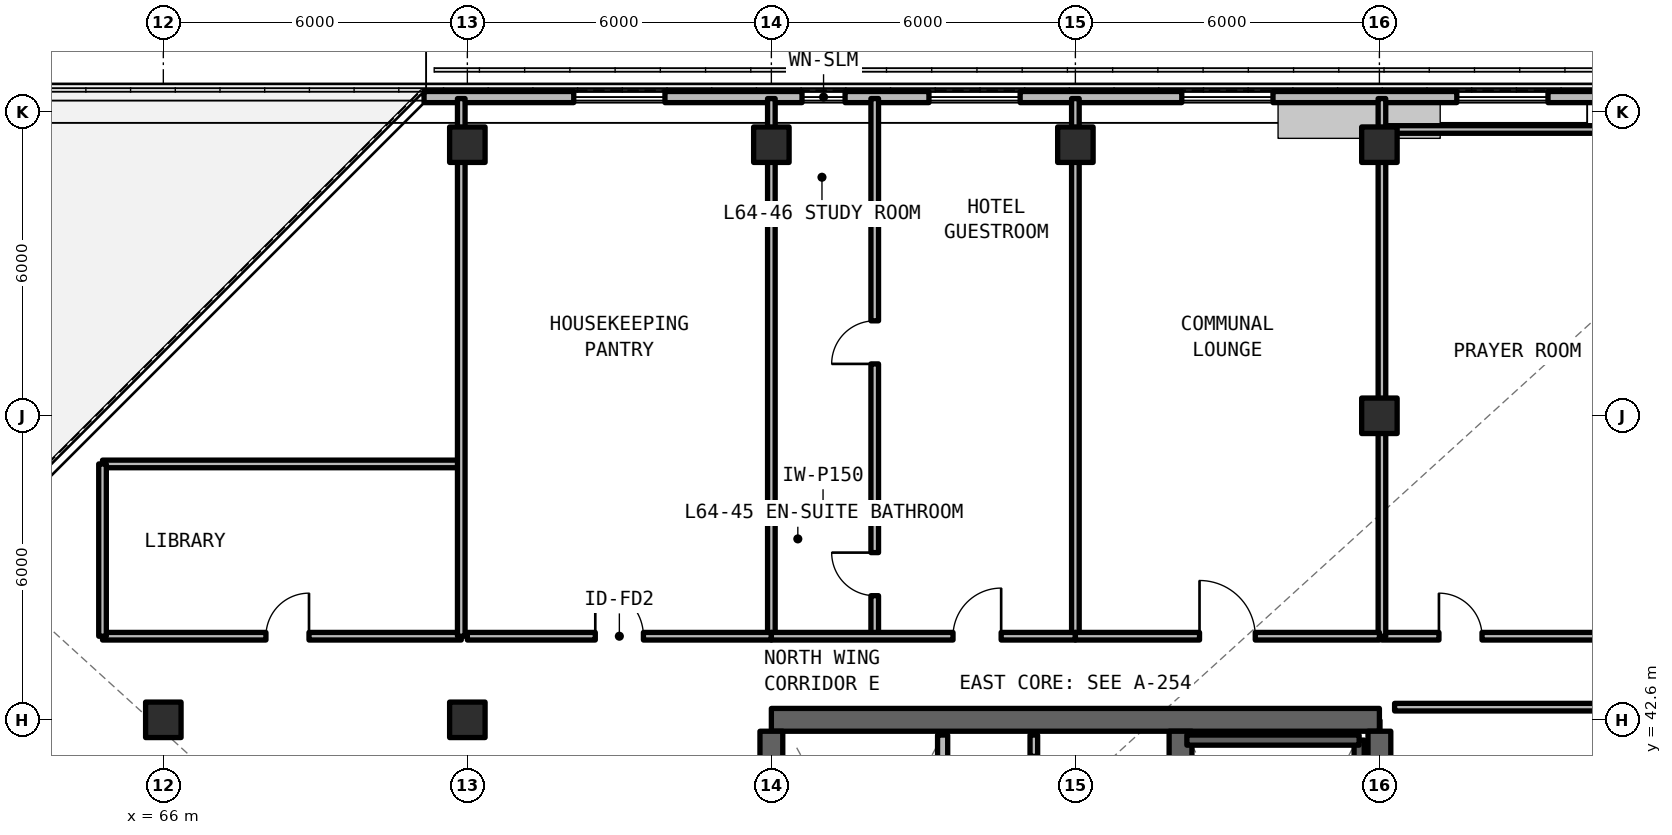
"""IFC4 building model, lengths in metres.
Left out: names, types, materials, properties, quantities, classifications, styles, units other than length and angle.
Written with IfcOpenShell. Run it as: python <this file> out.ifc"""

import sys

from ifc_helpers import new_model, si_unit, direction, frame, frame_2d, origin, origin_2d, place, context, subcontext, project, spatial, rectangle, extrude, element, fill, save


model = new_model("IFC4")
c1 = context("Model", 3, precision=1e-05, world=origin(), true_north=direction((0.0, 1.0)))
c2 = subcontext(c1, "Body", "Model", "MODEL_VIEW")
j1 = project(units=[si_unit("LENGTHUNIT", "METRE"), si_unit("PLANEANGLEUNIT", "RADIAN")], contexts=[c1])
p1 = place(None, origin())
s1 = spatial("IfcSite", under=j1, at=p1, CompositionType="ELEMENT")
p2 = place(p1, origin())
s2 = spatial("IfcBuilding", under=s1, at=p2, CompositionType="ELEMENT")
p3 = place(p2, frame((0.0, 0.0, 229.35)))
s3 = spatial("IfcBuildingStorey", under=s2, at=p3, CompositionType="ELEMENT", Elevation=229.35)
p4 = place(p3, frame((90.0, 42.6, 0.0), z_axis=(0.0, 0.0, 1.0), x_axis=(-1.0, 0.0, 0.0)))
e1 = element("IfcWall", 1, at=p4, inside=s3, PredefinedType="SHEAR", context=c2, shape_type="SweptSolid", body=[
    extrude(rectangle(XDim=12.0, YDim=0.45, at=frame_2d((6.0, 0.0))), origin(), (0.0, 0.0, 1.0), 3.3),
])
p5 = place(p3, frame((90.0, 24.825, 0.0), z_axis=(0.0, 0.0, 1.0), x_axis=(0.0, 1.0, 0.0)))
e2 = element("IfcWall", 2, at=p5, inside=s3, PredefinedType="SHEAR", context=c2, shape_type="SweptSolid", body=[
    extrude(rectangle(XDim=17.55, YDim=0.45, at=frame_2d((8.775, 0.0))), origin(), (0.0, 0.0, 1.0), 3.3),
])
p6 = place(p3, frame((78.0, 36.8, 0.0), z_axis=(0.0, 0.0, 1.0), x_axis=(0.0, 1.0, 0.0)))
e3 = element("IfcWall", 3, at=p6, inside=s3, PredefinedType="SHEAR", context=c2, shape_type="SweptSolid", body=[
    extrude(rectangle(XDim=5.575, YDim=0.45, at=frame_2d((2.788, 0.0))), origin(), (0.0, 0.0, 1.0), 3.3),
])
p7 = place(p3, frame((86.075, 24.825, 0.0), z_axis=(0.0, 0.0, 1.0), x_axis=(0.0, 1.0, 0.0)))
e4 = element("IfcWall", 4, at=p7, inside=s3, PredefinedType="SHEAR", context=c2, shape_type="SweptSolid", body=[
    extrude(rectangle(XDim=17.55, YDim=0.45, at=frame_2d((8.775, 0.0))), origin(), (0.0, 0.0, 1.0), 3.3),
])
p8 = place(p7, frame((0.425, 0.0, 0.0)))
e5 = element("IfcOpeningElement", 5, at=p8, cuts=e4, PredefinedType="OPENING", context=c2, shape_type="SweptSolid", body=[
    extrude(rectangle(XDim=1.15, YDim=2.15, at=frame_2d((0.575, 1.075))), frame((0.0, 0.235, 0.0), z_axis=(0.0, -1.0, 0.0), x_axis=(1.0, 0.0, 0.0)), (0.0, 0.0, 1.0), 0.47),
])
p9 = place(p7, frame((9.625, 0.0, 0.0)))
e6 = element("IfcOpeningElement", 6, at=p9, cuts=e4, PredefinedType="OPENING", context=c2, shape_type="SweptSolid", body=[
    extrude(rectangle(XDim=1.15, YDim=2.15, at=frame_2d((0.575, 1.075))), frame((0.0, 0.235, 0.0), z_axis=(0.0, -1.0, 0.0), x_axis=(1.0, 0.0, 0.0)), (0.0, 0.0, 1.0), 0.47),
])
for number, where, z_axis, x_axis in (
    (7, (66.0, 42.6, 0.0), (0.0, 0.0, 1.0), (1.0, 0.0, 0.0)),
    (8, (72.0, 42.6, 0.0), (0.0, 0.0, 1.0), (1.0, 0.0, 0.0)),
    (9, (90.0, 48.6, 0.0), (0.0, 0.0, 1.0), (1.0, 0.0, 0.0)),
    (10, (72.0, 53.95, 0.0), (0.0, 0.0, 1.0), (1.0, 0.0, 0.0)),
    (11, (78.0, 53.95, 0.0), (0.0, 0.0, 1.0), (1.0, 0.0, 0.0)),
    (12, (84.0, 53.95, 0.0), (0.0, 0.0, 1.0), (1.0, 0.0, 0.0)),
    (13, (90.0, 53.95, 0.0), (0.0, 0.0, 1.0), (1.0, 0.0, 0.0)),
):
    element("IfcColumn", number, at=place(p3, frame(where, z_axis=z_axis, x_axis=x_axis)), inside=s3, PredefinedType="COLUMN", context=c2, shape_type="SweptSolid", body=[
        extrude(rectangle(XDim=0.7, YDim=0.7, at=origin_2d()), origin(), (0.0, 0.0, 1.0), 3.3),
    ])
p10 = place(p3, frame((94.754, 54.89, 0.0), z_axis=(0.0, 0.0, 1.0), x_axis=(-1.0, 0.0, 0.0)))
e14 = element("IfcWall", 14, at=p10, inside=s3, PredefinedType="SOLIDWALL", context=c2, shape_type="SweptSolid", body=[
    extrude(rectangle(XDim=23.609, YDim=0.22, at=frame_2d((11.804, 0.0))), origin(), (0.0, 0.0, 1.0), 3.08),
])
p11 = place(p10, frame((1.427, 0.0, 0.78)))
e15 = element("IfcOpeningElement", 15, at=p11, cuts=e14, PredefinedType="OPENING", context=c2, shape_type="SweptSolid", body=[
    extrude(rectangle(XDim=1.8, YDim=1.66, at=frame_2d((0.9, 0.83))), frame((0.0, 0.12, 0.0), z_axis=(0.0, -1.0, 0.0), x_axis=(1.0, 0.0, 0.0)), (0.0, 0.0, 1.0), 0.24),
])
p12 = place(p10, frame((18.854, 0.0, 0.78)))
e16 = element("IfcOpeningElement", 16, at=p12, cuts=e14, PredefinedType="OPENING", context=c2, shape_type="SweptSolid", body=[
    extrude(rectangle(XDim=1.8, YDim=1.66, at=frame_2d((0.9, 0.83))), frame((0.0, 0.12, 0.0), z_axis=(0.0, -1.0, 0.0), x_axis=(1.0, 0.0, 0.0)), (0.0, 0.0, 1.0), 0.24),
])
p13 = place(p10, frame((15.299, 0.0, 0.78)))
e17 = element("IfcOpeningElement", 17, at=p13, cuts=e14, PredefinedType="OPENING", context=c2, shape_type="SweptSolid", body=[
    extrude(rectangle(XDim=0.85, YDim=1.65, at=frame_2d((0.425, 0.825))), frame((0.0, 0.12, 0.0), z_axis=(0.0, -1.0, 0.0), x_axis=(1.0, 0.0, 0.0)), (0.0, 0.0, 1.0), 0.24),
])
p14 = place(p10, frame((11.844, 0.0, 0.78)))
e18 = element("IfcOpeningElement", 18, at=p14, cuts=e14, PredefinedType="OPENING", context=c2, shape_type="SweptSolid", body=[
    extrude(rectangle(XDim=1.8, YDim=1.66, at=frame_2d((0.9, 0.83))), frame((0.0, 0.12, 0.0), z_axis=(0.0, -1.0, 0.0), x_axis=(1.0, 0.0, 0.0)), (0.0, 0.0, 1.0), 0.24),
])
p15 = place(p10, frame((6.854, 0.0, 0.78)))
e19 = element("IfcOpeningElement", 19, at=p15, cuts=e14, PredefinedType="OPENING", context=c2, shape_type="SweptSolid", body=[
    extrude(rectangle(XDim=1.8, YDim=1.66, at=frame_2d((0.9, 0.83))), frame((0.0, 0.12, 0.0), z_axis=(0.0, -1.0, 0.0), x_axis=(1.0, 0.0, 0.0)), (0.0, 0.0, 1.0), 0.24),
])
p16 = place(p3, frame((83.18, 36.88, 0.0), z_axis=(0.0, 0.0, 1.0), x_axis=(0.0, 1.0, 0.0)))
e20 = element("IfcWall", 20, at=p16, inside=s3, PredefinedType="SOLIDWALL", context=c2, shape_type="SweptSolid", body=[
    extrude(rectangle(XDim=5.42, YDim=0.15, at=frame_2d((2.71, 0.0))), origin(), (0.0, 0.0, 1.0), 2.35),
])
p17 = place(p16, frame((1.15, 0.0, 0.0)))
e21 = element("IfcOpeningElement", 21, at=p17, cuts=e20, PredefinedType="OPENING", context=c2, shape_type="SweptSolid", body=[
    extrude(rectangle(XDim=0.95, YDim=2.15, at=frame_2d((0.475, 1.075))), frame((0.0, 0.085, 0.0), z_axis=(0.0, -1.0, 0.0), x_axis=(1.0, 0.0, 0.0)), (0.0, 0.0, 1.0), 0.17),
])
p18 = place(p16, frame((4.05, 0.0, 0.0)))
e22 = element("IfcOpeningElement", 22, at=p18, cuts=e20, PredefinedType="OPENING", context=c2, shape_type="SweptSolid", body=[
    extrude(rectangle(XDim=0.95, YDim=2.15, at=frame_2d((0.475, 1.075))), frame((0.0, 0.085, 0.0), z_axis=(0.0, -1.0, 0.0), x_axis=(1.0, 0.0, 0.0)), (0.0, 0.0, 1.0), 0.17),
])
p19 = place(p3, frame((81.38, 36.88, 0.0), z_axis=(0.0, 0.0, 1.0), x_axis=(0.0, 1.0, 0.0)))
e23 = element("IfcWall", 23, at=p19, inside=s3, PredefinedType="SOLIDWALL", context=c2, shape_type="SweptSolid", body=[
    extrude(rectangle(XDim=5.42, YDim=0.2, at=frame_2d((2.71, 0.0))), origin(), (0.0, 0.0, 1.0), 2.35),
])
p20 = place(p19, frame((0.8, 0.0, 0.0)))
e24 = element("IfcOpeningElement", 24, at=p20, cuts=e23, PredefinedType="OPENING", context=c2, shape_type="SweptSolid", body=[
    extrude(rectangle(XDim=1.1, YDim=2.2, at=frame_2d((0.55, 1.1))), frame((0.0, 0.11, 0.0), z_axis=(0.0, -1.0, 0.0), x_axis=(1.0, 0.0, 0.0)), (0.0, 0.0, 1.0), 0.22),
])
p21 = place(p19, frame((3.3, 0.0, 0.0)))
e25 = element("IfcOpeningElement", 25, at=p21, cuts=e23, PredefinedType="OPENING", context=c2, shape_type="SweptSolid", body=[
    extrude(rectangle(XDim=1.1, YDim=2.2, at=frame_2d((0.55, 1.1))), frame((0.0, 0.11, 0.0), z_axis=(0.0, -1.0, 0.0), x_axis=(1.0, 0.0, 0.0)), (0.0, 0.0, 1.0), 0.22),
])
p22 = place(p3, frame((64.8, 44.25, 0.0), z_axis=(0.0, 0.0, 1.0), x_axis=(1.0, 0.0, 0.0)))
e26 = element("IfcWall", 26, at=p22, inside=s3, PredefinedType="SOLIDWALL", context=c2, shape_type="SweptSolid", body=[
    extrude(rectangle(XDim=7.08, YDim=0.15, at=frame_2d((3.54, 0.0))), origin(), (0.0, 0.0, 1.0), 2.35),
])
p23 = place(p22, frame((3.225, 0.0, 0.0)))
e27 = element("IfcOpeningElement", 27, at=p23, cuts=e26, PredefinedType="OPENING", context=c2, shape_type="SweptSolid", body=[
    extrude(rectangle(XDim=0.85, YDim=2.1, at=frame_2d((0.425, 1.05))), frame((0.0, 0.085, 0.0), z_axis=(0.0, -1.0, 0.0), x_axis=(1.0, 0.0, 0.0)), (0.0, 0.0, 1.0), 0.17),
])
p24 = place(p3, frame((64.8, 47.65, 0.0), z_axis=(0.0, 0.0, 1.0), x_axis=(1.0, 0.0, 0.0)))
e28 = element("IfcWall", 28, at=p24, inside=s3, PredefinedType="SOLIDWALL", context=c2, shape_type="SweptSolid", body=[
    extrude(rectangle(XDim=7.08, YDim=0.15, at=frame_2d((3.54, 0.0))), origin(), (0.0, 0.0, 1.0), 2.35),
])
p25 = place(p3, frame((64.8, 44.25, 0.0), z_axis=(0.0, 0.0, 1.0), x_axis=(0.0, 1.0, 0.0)))
e29 = element("IfcWall", 29, at=p25, inside=s3, PredefinedType="SOLIDWALL", context=c2, shape_type="SweptSolid", body=[
    extrude(rectangle(XDim=3.4, YDim=0.15, at=frame_2d((1.7, 0.0))), origin(), (0.0, 0.0, 1.0), 2.35),
])
p26 = place(p3, frame((71.88, 44.25, 0.0), z_axis=(0.0, 0.0, 1.0), x_axis=(0.0, 1.0, 0.0)))
e30 = element("IfcWall", 30, at=p26, inside=s3, PredefinedType="SOLIDWALL", context=c2, shape_type="SweptSolid", body=[
    extrude(rectangle(XDim=10.61, YDim=0.15, at=frame_2d((5.305, 0.0))), origin(), (0.0, 0.0, 1.0), 2.35),
])
p27 = place(p3, frame((90.3, 42.85, 0.0), z_axis=(0.0, 0.0, 1.0), x_axis=(1.0, 0.0, 0.0)))
e31 = element("IfcWall", 31, at=p27, inside=s3, PredefinedType="SOLIDWALL", context=c2, shape_type="SweptSolid", body=[
    extrude(rectangle(XDim=8.52, YDim=0.15, at=frame_2d((4.26, 0.0))), origin(), (0.0, 0.0, 1.0), 2.35),
])
p28 = place(p3, frame((90.05, 44.25, 0.0), z_axis=(0.0, 0.0, 1.0), x_axis=(1.0, 0.0, 0.0)))
e32 = element("IfcWall", 32, at=p28, inside=s3, PredefinedType="SOLIDWALL", context=c2, shape_type="SweptSolid", body=[
    extrude(rectangle(XDim=5.37, YDim=0.15, at=frame_2d((2.685, 0.0))), origin(), (0.0, 0.0, 1.0), 2.35),
])
p29 = place(p28, frame((1.125, 0.0, 0.0)))
e33 = element("IfcOpeningElement", 33, at=p29, cuts=e32, PredefinedType="OPENING", context=c2, shape_type="SweptSolid", body=[
    extrude(rectangle(XDim=0.85, YDim=2.1, at=frame_2d((0.425, 1.05))), frame((0.0, 0.085, 0.0), z_axis=(0.0, -1.0, 0.0), x_axis=(1.0, 0.0, 0.0)), (0.0, 0.0, 1.0), 0.17),
])
p30 = place(p3, frame((90.05, 54.25, 0.0), z_axis=(0.0, 0.0, 1.0), x_axis=(1.0, 0.0, 0.0)))
e34 = element("IfcWall", 34, at=p30, inside=s3, PredefinedType="SOLIDWALL", context=c2, shape_type="SweptSolid", body=[
    extrude(rectangle(XDim=5.37, YDim=0.15, at=frame_2d((2.685, 0.0))), origin(), (0.0, 0.0, 1.0), 2.35),
])
for number, where, z_axis, x_axis in (
    (35, (90.05, 44.25, 0.0), (0.0, 0.0, 1.0), (0.0, 1.0, 0.0)),
    (36, (78.0, 44.25, 0.0), (0.0, 0.0, 1.0), (0.0, 1.0, 0.0)),
):
    element("IfcWall", number, at=place(p3, frame(where, z_axis=z_axis, x_axis=x_axis)), inside=s3, PredefinedType="SOLIDWALL", context=c2, shape_type="SweptSolid", body=[
        extrude(rectangle(XDim=10.61, YDim=0.15, at=frame_2d((5.305, 0.0))), origin(), (0.0, 0.0, 1.0), 2.35),
    ])
p31 = place(p3, frame((72.0, 44.25, 0.0), z_axis=(0.0, 0.0, 1.0), x_axis=(1.0, 0.0, 0.0)))
e37 = element("IfcWall", 37, at=p31, inside=s3, PredefinedType="SOLIDWALL", context=c2, shape_type="SweptSolid", body=[
    extrude(rectangle(XDim=6.0, YDim=0.15, at=frame_2d((3.0, 0.0))), origin(), (0.0, 0.0, 1.0), 2.35),
])
p32 = place(p31, frame((2.525, 0.0, 0.0)))
e38 = element("IfcOpeningElement", 38, at=p32, cuts=e37, PredefinedType="OPENING", context=c2, shape_type="SweptSolid", body=[
    extrude(rectangle(XDim=0.95, YDim=2.15, at=frame_2d((0.475, 1.075))), frame((0.0, 0.085, 0.0), z_axis=(0.0, -1.0, 0.0), x_axis=(1.0, 0.0, 0.0)), (0.0, 0.0, 1.0), 0.17),
])
p33 = place(p3, frame((84.0, 44.25, 0.0), z_axis=(0.0, 0.0, 1.0), x_axis=(0.0, 1.0, 0.0)))
e39 = element("IfcWall", 39, at=p33, inside=s3, PredefinedType="SOLIDWALL", context=c2, shape_type="SweptSolid", body=[
    extrude(rectangle(XDim=10.61, YDim=0.15, at=frame_2d((5.305, 0.0))), origin(), (0.0, 0.0, 1.0), 2.35),
])
p34 = place(p3, frame((78.0, 46.7, 0.0), z_axis=(0.0, 0.0, 1.0), x_axis=(1.0, 0.0, 0.0)))
e40 = element("IfcWall", 40, at=p34, inside=s3, PredefinedType="PARTITIONING", context=c2, shape_type="SweptSolid", body=[
    extrude(rectangle(XDim=2.04, YDim=0.15, at=frame_2d((1.02, 0.0))), origin(), (0.0, 0.0, 1.0), 2.35),
])
p35 = place(p3, frame((80.04, 44.25, 0.0), z_axis=(0.0, 0.0, 1.0), x_axis=(0.0, 1.0, 0.0)))
e41 = element("IfcWall", 41, at=p35, inside=s3, PredefinedType="PARTITIONING", context=c2, shape_type="SweptSolid", body=[
    extrude(rectangle(XDim=10.61, YDim=0.15, at=frame_2d((5.305, 0.0))), origin(), (0.0, 0.0, 1.0), 2.35),
])
p36 = place(p35, frame((0.8, 0.0, 0.0)))
e42 = element("IfcOpeningElement", 42, at=p36, cuts=e41, PredefinedType="OPENING", context=c2, shape_type="SweptSolid", body=[
    extrude(rectangle(XDim=0.85, YDim=2.1, at=frame_2d((0.425, 1.05))), frame((0.0, 0.085, 0.0), z_axis=(0.0, -1.0, 0.0), x_axis=(1.0, 0.0, 0.0)), (0.0, 0.0, 1.0), 0.17),
])
p37 = place(p35, frame((5.374, 0.0, 0.0)))
e43 = element("IfcOpeningElement", 43, at=p37, cuts=e41, PredefinedType="OPENING", context=c2, shape_type="SweptSolid", body=[
    extrude(rectangle(XDim=0.85, YDim=2.1, at=frame_2d((0.425, 1.05))), frame((0.0, 0.085, 0.0), z_axis=(0.0, -1.0, 0.0), x_axis=(1.0, 0.0, 0.0)), (0.0, 0.0, 1.0), 0.17),
])
p38 = place(p3, frame((78.0, 44.25, 0.0), z_axis=(0.0, 0.0, 1.0), x_axis=(1.0, 0.0, 0.0)))
e44 = element("IfcWall", 44, at=p38, inside=s3, PredefinedType="SOLIDWALL", context=c2, shape_type="SweptSolid", body=[
    extrude(rectangle(XDim=6.0, YDim=0.15, at=frame_2d((3.0, 0.0))), origin(), (0.0, 0.0, 1.0), 2.35),
])
p39 = place(p38, frame((3.585, 0.0, 0.0)))
e45 = element("IfcOpeningElement", 45, at=p39, cuts=e44, PredefinedType="OPENING", context=c2, shape_type="SweptSolid", body=[
    extrude(rectangle(XDim=0.95, YDim=2.15, at=frame_2d((0.475, 1.075))), frame((0.0, 0.085, 0.0), z_axis=(0.0, -1.0, 0.0), x_axis=(1.0, 0.0, 0.0)), (0.0, 0.0, 1.0), 0.17),
])
p40 = place(p3, frame((84.0, 44.25, 0.0), z_axis=(0.0, 0.0, 1.0), x_axis=(1.0, 0.0, 0.0)))
e46 = element("IfcWall", 46, at=p40, inside=s3, PredefinedType="SOLIDWALL", context=c2, shape_type="SweptSolid", body=[
    extrude(rectangle(XDim=6.0, YDim=0.15, at=frame_2d((3.0, 0.0))), origin(), (0.0, 0.0, 1.0), 2.35),
])
p41 = place(p40, frame((2.45, 0.0, 0.0)))
e47 = element("IfcOpeningElement", 47, at=p41, cuts=e46, PredefinedType="OPENING", context=c2, shape_type="SweptSolid", body=[
    extrude(rectangle(XDim=1.1, YDim=2.15, at=frame_2d((0.55, 1.075))), frame((0.0, 0.085, 0.0), z_axis=(0.0, -1.0, 0.0), x_axis=(1.0, 0.0, 0.0)), (0.0, 0.0, 1.0), 0.17),
])
p42 = place(p3, frame((89.6, 34.2, 0.0), z_axis=(0.0, 0.0, 1.0), x_axis=(0.0, 1.0, 0.0)))
e48 = element("IfcWall", 48, at=p42, inside=s3, PredefinedType="SOLIDWALL", context=c2, shape_type="SweptSolid", body=[
    extrude(rectangle(XDim=8.0, YDim=0.2, at=frame_2d((4.0, 0.0))), origin(), (0.0, 0.0, 1.0), 3.3),
])
p43 = place(p3, frame((89.6, 42.2, 0.0), z_axis=(0.0, 0.0, 1.0), x_axis=(-1.0, 0.0, 0.0)))
e49 = element("IfcWall", 49, at=p43, inside=s3, PredefinedType="SOLIDWALL", context=c2, shape_type="SweptSolid", body=[
    extrude(rectangle(XDim=3.4, YDim=0.2, at=frame_2d((1.7, 0.0))), origin(), (0.0, 0.0, 1.0), 3.3),
])
p44 = place(p11, origin())
e50 = element("IfcWindow", 50, at=p44, inside=s3, PartitioningType="SINGLE_PANEL", PredefinedType="WINDOW", context=c2, shape_type="SweptSolid", body=[
    extrude(rectangle(XDim=1.8, YDim=1.66, at=frame_2d((0.9, 0.83))), frame((0.0, 0.03, 0.0), z_axis=(0.0, -1.0, 0.0), x_axis=(1.0, 0.0, 0.0)), (0.0, 0.0, 1.0), 0.06),
])
fill(e15, e50)
p45 = place(p12, origin())
e51 = element("IfcWindow", 51, at=p45, inside=s3, PartitioningType="SINGLE_PANEL", PredefinedType="WINDOW", context=c2, shape_type="SweptSolid", body=[
    extrude(rectangle(XDim=1.8, YDim=1.66, at=frame_2d((0.9, 0.83))), frame((0.0, 0.03, 0.0), z_axis=(0.0, -1.0, 0.0), x_axis=(1.0, 0.0, 0.0)), (0.0, 0.0, 1.0), 0.06),
])
fill(e16, e51)
p46 = place(p13, origin())
e52 = element("IfcWindow", 52, at=p46, inside=s3, PartitioningType="SINGLE_PANEL", PredefinedType="WINDOW", context=c2, shape_type="SweptSolid", body=[
    extrude(rectangle(XDim=0.85, YDim=1.65, at=frame_2d((0.425, 0.825))), frame((0.0, 0.03, 0.0), z_axis=(0.0, -1.0, 0.0), x_axis=(1.0, 0.0, 0.0)), (0.0, 0.0, 1.0), 0.06),
])
fill(e17, e52)
p47 = place(p14, origin())
e53 = element("IfcWindow", 53, at=p47, inside=s3, PartitioningType="SINGLE_PANEL", PredefinedType="WINDOW", context=c2, shape_type="SweptSolid", body=[
    extrude(rectangle(XDim=1.8, YDim=1.66, at=frame_2d((0.9, 0.83))), frame((0.0, 0.03, 0.0), z_axis=(0.0, -1.0, 0.0), x_axis=(1.0, 0.0, 0.0)), (0.0, 0.0, 1.0), 0.06),
])
fill(e18, e53)
p48 = place(p15, origin())
e54 = element("IfcWindow", 54, at=p48, inside=s3, PartitioningType="SINGLE_PANEL", PredefinedType="WINDOW", context=c2, shape_type="SweptSolid", body=[
    extrude(rectangle(XDim=1.8, YDim=1.66, at=frame_2d((0.9, 0.83))), frame((0.0, 0.03, 0.0), z_axis=(0.0, -1.0, 0.0), x_axis=(1.0, 0.0, 0.0)), (0.0, 0.0, 1.0), 0.06),
])
fill(e19, e54)
p49 = place(p23, origin())
e55 = element("IfcDoor", 55, at=p49, inside=s3, OperationType="SINGLE_SWING_RIGHT", PredefinedType="DOOR", context=c2, shape_type="SweptSolid", body=[
    extrude(rectangle(XDim=0.85, YDim=2.1, at=frame_2d((0.425, 1.05))), frame((0.0, 0.025, 0.0), z_axis=(0.0, -1.0, 0.0), x_axis=(1.0, 0.0, 0.0)), (0.0, 0.0, 1.0), 0.05),
])
fill(e27, e55)
p50 = place(p29, origin())
e56 = element("IfcDoor", 56, at=p50, inside=s3, OperationType="SINGLE_SWING_LEFT", PredefinedType="DOOR", context=c2, shape_type="SweptSolid", body=[
    extrude(rectangle(XDim=0.85, YDim=2.1, at=frame_2d((0.425, 1.05))), frame((0.0, 0.025, 0.0), z_axis=(0.0, -1.0, 0.0), x_axis=(1.0, 0.0, 0.0)), (0.0, 0.0, 1.0), 0.05),
])
fill(e33, e56)
p51 = place(p32, origin())
e57 = element("IfcDoor", 57, at=p51, inside=s3, OperationType="SINGLE_SWING_LEFT", PredefinedType="DOOR", context=c2, shape_type="SweptSolid", body=[
    extrude(rectangle(XDim=0.95, YDim=2.15, at=frame_2d((0.475, 1.075))), frame((0.0, 0.025, 0.0), z_axis=(0.0, -1.0, 0.0), x_axis=(1.0, 0.0, 0.0)), (0.0, 0.0, 1.0), 0.05),
])
fill(e38, e57)
p52 = place(p36, origin())
e58 = element("IfcDoor", 58, at=p52, inside=s3, OperationType="SINGLE_SWING_RIGHT", PredefinedType="DOOR", context=c2, shape_type="SweptSolid", body=[
    extrude(rectangle(XDim=0.85, YDim=2.1, at=frame_2d((0.425, 1.05))), frame((0.0, 0.025, 0.0), z_axis=(0.0, -1.0, 0.0), x_axis=(1.0, 0.0, 0.0)), (0.0, 0.0, 1.0), 0.05),
])
fill(e42, e58)
p53 = place(p37, origin())
e59 = element("IfcDoor", 59, at=p53, inside=s3, OperationType="SINGLE_SWING_LEFT", PredefinedType="DOOR", context=c2, shape_type="SweptSolid", body=[
    extrude(rectangle(XDim=0.85, YDim=2.1, at=frame_2d((0.425, 1.05))), frame((0.0, 0.025, 0.0), z_axis=(0.0, -1.0, 0.0), x_axis=(1.0, 0.0, 0.0)), (0.0, 0.0, 1.0), 0.05),
])
fill(e43, e59)
p54 = place(p39, origin())
e60 = element("IfcDoor", 60, at=p54, inside=s3, OperationType="SINGLE_SWING_RIGHT", PredefinedType="DOOR", context=c2, shape_type="SweptSolid", body=[
    extrude(rectangle(XDim=0.95, YDim=2.15, at=frame_2d((0.475, 1.075))), frame((0.0, 0.025, 0.0), z_axis=(0.0, -1.0, 0.0), x_axis=(1.0, 0.0, 0.0)), (0.0, 0.0, 1.0), 0.05),
])
fill(e45, e60)
p55 = place(p41, origin())
e61 = element("IfcDoor", 61, at=p55, inside=s3, OperationType="SINGLE_SWING_LEFT", PredefinedType="DOOR", context=c2, shape_type="SweptSolid", body=[
    extrude(rectangle(XDim=1.1, YDim=2.15, at=frame_2d((0.55, 1.075))), frame((0.0, 0.025, 0.0), z_axis=(0.0, -1.0, 0.0), x_axis=(1.0, 0.0, 0.0)), (0.0, 0.0, 1.0), 0.05),
])
fill(e47, e61)
save(model, sys.argv[1])
